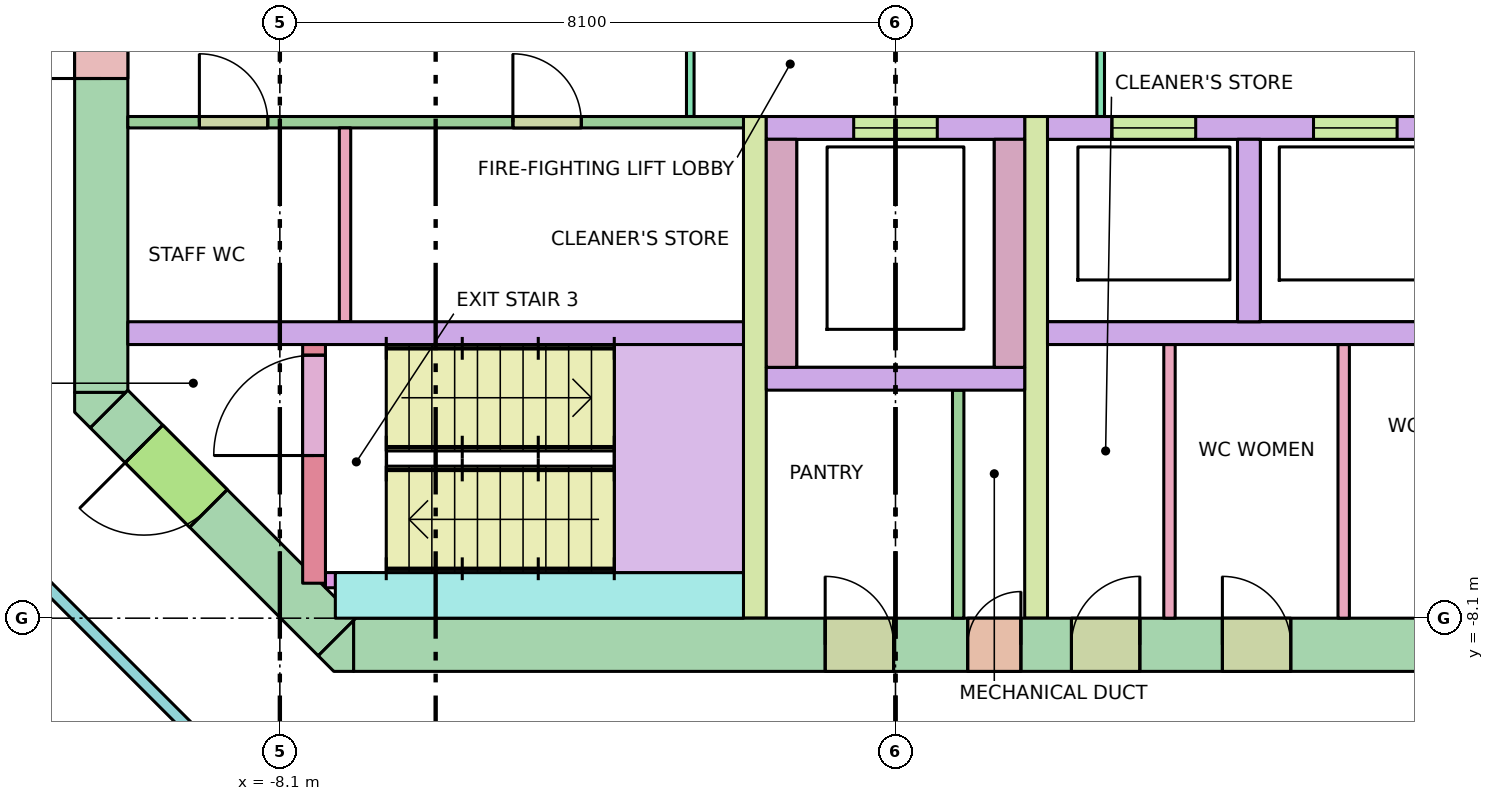
"""IFC4 building model, lengths in metres.
Left out: names, types, materials, properties, quantities, classifications, styles, units other than length and angle.
Written with IfcOpenShell. Run it as: python <this file> out.ifc"""

import sys

from ifc_helpers import new_model, si_unit, direction, frame, frame_2d, origin, place, context, subcontext, project, spatial, polyline, rectangle, outline, extrude, element, fill, save


model = new_model("IFC4")
c1 = context("Model", 3, precision=1e-05, world=origin(), true_north=direction((0.0, 1.0)))
c2 = subcontext(c1, "Body", "Model", "MODEL_VIEW")
j1 = project(units=[si_unit("LENGTHUNIT", "METRE"), si_unit("PLANEANGLEUNIT", "RADIAN")], contexts=[c1])
p1 = place(None, origin())
s1 = spatial("IfcSite", under=j1, at=p1, CompositionType="ELEMENT")
p2 = place(p1, origin())
s2 = spatial("IfcBuilding", under=s1, at=p2, CompositionType="ELEMENT")
p3 = place(p2, frame((0.0, 0.0, 192.8)))
s3 = spatial("IfcBuildingStorey", under=s2, at=p3, CompositionType="ELEMENT", Elevation=192.8)
p4 = place(p3, frame((-7.13, -8.45, -0.28), z_axis=(0.0, 0.0, 1.0), x_axis=(1.0, 0.0, 0.0)))
e1 = element("IfcWall", 1, at=p4, inside=s3, PredefinedType="SHEAR", context=c2, shape_type="SweptSolid", body=[
    extrude(rectangle(XDim=14.26, YDim=0.7, at=frame_2d((7.13, 0.0))), origin(), (0.0, 0.0, 1.0), 3.7),
])
p5 = place(p4, frame((8.08, 0.0, 0.28)))
e2 = element("IfcOpeningElement", 2, at=p5, cuts=e1, PredefinedType="OPENING", context=c2, shape_type="SweptSolid", body=[
    extrude(rectangle(XDim=0.7, YDim=2.1, at=frame_2d((0.35, 1.05))), frame((0.0, 0.36, 0.0), z_axis=(0.0, -1.0, 0.0), x_axis=(1.0, 0.0, 0.0)), (0.0, 0.0, 1.0), 0.72),
])
p6 = place(p4, frame((6.205, 0.0, 0.28)))
e3 = element("IfcOpeningElement", 3, at=p6, cuts=e1, PredefinedType="OPENING", context=c2, shape_type="SweptSolid", body=[
    extrude(rectangle(XDim=0.9, YDim=2.1, at=frame_2d((0.45, 1.05))), frame((0.0, 0.36, 0.0), z_axis=(0.0, -1.0, 0.0), x_axis=(1.0, 0.0, 0.0)), (0.0, 0.0, 1.0), 0.72),
])
p7 = place(p4, frame((9.445, 0.0, 0.28)))
e4 = element("IfcOpeningElement", 4, at=p7, cuts=e1, PredefinedType="OPENING", context=c2, shape_type="SweptSolid", body=[
    extrude(rectangle(XDim=0.9, YDim=2.1, at=frame_2d((0.45, 1.05))), frame((0.0, 0.36, 0.0), z_axis=(0.0, -1.0, 0.0), x_axis=(1.0, 0.0, 0.0)), (0.0, 0.0, 1.0), 0.72),
])
p8 = place(p4, frame((11.431, 0.0, 0.28)))
e5 = element("IfcOpeningElement", 5, at=p8, cuts=e1, PredefinedType="OPENING", context=c2, shape_type="SweptSolid", body=[
    extrude(rectangle(XDim=0.9, YDim=2.1, at=frame_2d((0.45, 1.05))), frame((0.0, 0.36, 0.0), z_axis=(0.0, -1.0, 0.0), x_axis=(1.0, 0.0, 0.0)), (0.0, 0.0, 1.0), 0.72),
])
p9 = place(p3, frame((-10.45, -5.13, -0.28), z_axis=(0.0, 0.0, 1.0), x_axis=(0.0, 1.0, 0.0)))
e6 = element("IfcWall", 6, at=p9, inside=s3, PredefinedType="SHEAR", context=c2, shape_type="SweptSolid", body=[
    extrude(rectangle(XDim=10.26, YDim=0.7, at=frame_2d((5.13, 0.0))), origin(), (0.0, 0.0, 1.0), 3.7),
])
p10 = place(p9, frame((4.13, 0.0, 0.28)))
e7 = element("IfcOpeningElement", 7, at=p10, cuts=e6, PredefinedType="OPENING", context=c2, shape_type="SweptSolid", body=[
    extrude(rectangle(XDim=2.0, YDim=2.1, at=frame_2d((1.0, 1.05))), frame((0.0, 0.36, 0.0), z_axis=(0.0, -1.0, 0.0), x_axis=(1.0, 0.0, 0.0)), (0.0, 0.0, 1.0), 0.72),
])
p11 = place(p3, frame((-7.347, -8.347, -0.28), z_axis=(0.0, 0.0, 1.0), x_axis=(-0.707106781187, 0.707106781187, 0.0)))
e8 = element("IfcWall", 8, at=p11, inside=s3, PredefinedType="SHEAR", context=c2, shape_type="SweptSolid", body=[
    extrude(rectangle(XDim=4.243, YDim=0.7, at=frame_2d((2.121, 0.0))), origin(), (0.0, 0.0, 1.0), 3.7),
])
p12 = place(p11, frame((2.393, 0.0, 0.28)))
e9 = element("IfcOpeningElement", 9, at=p12, cuts=e8, PredefinedType="OPENING", context=c2, shape_type="SweptSolid", body=[
    extrude(rectangle(XDim=1.2, YDim=2.1, at=frame_2d((0.6, 1.05))), frame((0.0, 0.36, 0.0), z_axis=(0.0, -1.0, 0.0), x_axis=(1.0, 0.0, 0.0)), (0.0, 0.0, 1.0), 0.72),
])
p13 = place(p3, frame((0.0, 0.0, -0.28)))
e10 = element("IfcWall", 10, at=p13, inside=s3, PredefinedType="SHEAR", context=c2, shape_type="SweptSolid", body=[
    extrude(outline(polyline([(-7.39, -8.8), (-7.595, -8.595), (-7.595, -8.595), (-7.595, -8.595), (-7.13, -8.13), (-7.13, -8.8), (-7.13, -8.8), (-7.39, -8.8)])), origin(), (0.0, 0.0, 1.0), 3.7),
])
p14 = place(p3, frame((0.0, 0.0, -0.28)))
e11 = element("IfcWall", 11, at=p14, inside=s3, PredefinedType="SHEAR", context=c2, shape_type="SweptSolid", body=[
    extrude(outline(polyline([(-10.8, -5.39), (-10.8, -5.13), (-10.8, -5.13), (-10.13, -5.13), (-10.595, -5.595), (-10.595, -5.595), (-10.595, -5.595), (-10.8, -5.39)])), origin(), (0.0, 0.0, 1.0), 3.7),
])
for number, where, z_axis, x_axis in (
    (12, (-10.1, -4.35, 0.0), (0.0, 0.0, 1.0), (1.0, 0.0, 0.0)),
    (13, (2.0, -4.35, 0.0), (0.0, 0.0, 1.0), (1.0, 0.0, 0.0)),
):
    element("IfcWall", number, at=place(p3, frame(where, z_axis=z_axis, x_axis=x_axis)), inside=s3, PredefinedType="SOLIDWALL", context=c2, shape_type="SweptSolid", body=[
        extrude(rectangle(XDim=8.1, YDim=0.3, at=frame_2d((4.05, 0.0))), origin(), (0.0, 0.0, 1.0), 3.42),
    ])
p15 = place(p3, frame((2.0, -1.65, 0.0), z_axis=(0.0, 0.0, 1.0), x_axis=(1.0, 0.0, 0.0)))
e14 = element("IfcWall", 14, at=p15, inside=s3, PredefinedType="SOLIDWALL", context=c2, shape_type="SweptSolid", body=[
    extrude(rectangle(XDim=8.1, YDim=0.3, at=frame_2d((4.05, 0.0))), origin(), (0.0, 0.0, 1.0), 3.42),
])
p16 = place(p15, frame((0.85, 0.0, 0.0)))
e15 = element("IfcOpeningElement", 15, at=p16, cuts=e14, PredefinedType="OPENING", context=c2, shape_type="SweptSolid", body=[
    extrude(rectangle(XDim=1.1, YDim=2.1, at=frame_2d((0.55, 1.05))), frame((0.0, 0.16, 0.0), z_axis=(0.0, -1.0, 0.0), x_axis=(1.0, 0.0, 0.0)), (0.0, 0.0, 1.0), 0.32),
])
p17 = place(p15, frame((3.5, 0.0, 0.0)))
e16 = element("IfcOpeningElement", 16, at=p17, cuts=e14, PredefinedType="OPENING", context=c2, shape_type="SweptSolid", body=[
    extrude(rectangle(XDim=1.1, YDim=2.1, at=frame_2d((0.55, 1.05))), frame((0.0, 0.16, 0.0), z_axis=(0.0, -1.0, 0.0), x_axis=(1.0, 0.0, 0.0)), (0.0, 0.0, 1.0), 0.32),
])
p18 = place(p15, frame((6.3, 0.0, 0.0)))
e17 = element("IfcOpeningElement", 17, at=p18, cuts=e14, PredefinedType="OPENING", context=c2, shape_type="SweptSolid", body=[
    extrude(rectangle(XDim=1.1, YDim=2.1, at=frame_2d((0.55, 1.05))), frame((0.0, 0.16, 0.0), z_axis=(0.0, -1.0, 0.0), x_axis=(1.0, 0.0, 0.0)), (0.0, 0.0, 1.0), 0.32),
])
p19 = place(p3, frame((4.65, -4.2, 0.0), z_axis=(0.0, 0.0, 1.0), x_axis=(0.0, 1.0, 0.0)))
e18 = element("IfcWall", 18, at=p19, inside=s3, PredefinedType="SOLIDWALL", context=c2, shape_type="SweptSolid", body=[
    extrude(rectangle(XDim=2.4, YDim=0.3, at=frame_2d((1.2, 0.0))), origin(), (0.0, 0.0, 1.0), 3.42),
])
for number, where, z_axis, x_axis in (
    (19, (-1.85, -8.1, 0.0), (0.0, 0.0, 1.0), (0.0, 1.0, 0.0)),
    (20, (1.85, -8.1, 0.0), (0.0, 0.0, 1.0), (0.0, 1.0, 0.0)),
):
    element("IfcWall", number, at=place(p3, frame(where, z_axis=z_axis, x_axis=x_axis)), inside=s3, PredefinedType="SHEAR", context=c2, shape_type="SweptSolid", body=[
        extrude(rectangle(XDim=6.6, YDim=0.3, at=frame_2d((3.3, 0.0))), origin(), (0.0, 0.0, 1.0), 3.42),
    ])
p20 = place(p3, frame((-1.7, -1.65, 0.0), z_axis=(0.0, 0.0, 1.0), x_axis=(1.0, 0.0, 0.0)))
e21 = element("IfcWall", 21, at=p20, inside=s3, PredefinedType="SOLIDWALL", context=c2, shape_type="SweptSolid", body=[
    extrude(rectangle(XDim=3.4, YDim=0.3, at=frame_2d((1.7, 0.0))), origin(), (0.0, 0.0, 1.0), 3.42),
])
p21 = place(p20, frame((1.15, 0.0, 0.0)))
e22 = element("IfcOpeningElement", 22, at=p21, cuts=e21, PredefinedType="OPENING", context=c2, shape_type="SweptSolid", body=[
    extrude(rectangle(XDim=1.1, YDim=2.1, at=frame_2d((0.55, 1.05))), frame((0.0, 0.16, 0.0), z_axis=(0.0, -1.0, 0.0), x_axis=(1.0, 0.0, 0.0)), (0.0, 0.0, 1.0), 0.32),
])
for number, where, z_axis, x_axis in (
    (23, (-1.5, -4.8, 0.0), (0.0, 0.0, 1.0), (0.0, 1.0, 0.0)),
    (24, (1.5, -4.8, 0.0), (0.0, 0.0, 1.0), (0.0, 1.0, 0.0)),
):
    element("IfcWall", number, at=place(p3, frame(where, z_axis=z_axis, x_axis=x_axis)), inside=s3, PredefinedType="SOLIDWALL", context=c2, shape_type="SweptSolid", body=[
        extrude(rectangle(XDim=3.0, YDim=0.4, at=frame_2d((1.5, 0.0))), origin(), (0.0, 0.0, 1.0), 3.42),
    ])
p22 = place(p3, frame((-1.7, -4.95, 0.0), z_axis=(0.0, 0.0, 1.0), x_axis=(1.0, 0.0, 0.0)))
e25 = element("IfcWall", 25, at=p22, inside=s3, PredefinedType="SOLIDWALL", context=c2, shape_type="SweptSolid", body=[
    extrude(rectangle(XDim=3.4, YDim=0.3, at=frame_2d((1.7, 0.0))), origin(), (0.0, 0.0, 1.0), 3.42),
])
p23 = place(p3, frame((-7.65, -7.64, 0.0), z_axis=(0.0, 0.0, 1.0), x_axis=(0.0, 1.0, 0.0)))
e26 = element("IfcWall", 26, at=p23, inside=s3, PredefinedType="SHEAR", context=c2, shape_type="SweptSolid", body=[
    extrude(rectangle(XDim=3.14, YDim=0.3, at=frame_2d((1.57, 0.0))), origin(), (0.0, 0.0, 1.0), 3.42),
])
p24 = place(p23, frame((1.68, 0.0, 0.0)))
e27 = element("IfcOpeningElement", 27, at=p24, cuts=e26, PredefinedType="OPENING", context=c2, shape_type="SweptSolid", body=[
    extrude(rectangle(XDim=1.32, YDim=2.1, at=frame_2d((0.66, 1.05))), frame((0.0, 0.16, 0.0), z_axis=(0.0, -1.0, 0.0), x_axis=(1.0, 0.0, 0.0)), (0.0, 0.0, 1.0), 0.32),
])
p25 = place(p3, frame((-7.5, -7.6, 0.0), z_axis=(0.0, 0.0, 1.0), x_axis=(1.0, 0.0, 0.0)))
e28 = element("IfcWall", 28, at=p25, inside=s3, PredefinedType="SHEAR", context=c2, shape_type="SweptSolid", body=[
    extrude(rectangle(XDim=0.6, YDim=0.2, at=frame_2d((0.3, 0.0))), origin(), (0.0, 0.0, 1.0), 3.42),
])
p26 = place(p3, frame((-7.37, -7.8, 0.0), z_axis=(0.0, 0.0, 1.0), x_axis=(1.0, 0.0, 0.0)))
e29 = element("IfcWall", 29, at=p26, inside=s3, PredefinedType="SHEAR", context=c2, shape_type="SweptSolid", body=[
    extrude(rectangle(XDim=5.37, YDim=0.6, at=frame_2d((2.685, 0.0))), origin(), (0.0, 0.0, 1.0), 3.42),
])
p27 = place(p3, frame((-2.7, -1.5, 0.0), z_axis=(0.0, 0.0, 1.0), x_axis=(0.0, 1.0, 0.0)))
e30 = element("IfcWall", 30, at=p27, inside=s3, PredefinedType="PARTITIONING", context=c2, shape_type="SweptSolid", body=[
    extrude(rectangle(XDim=3.0, YDim=0.1, at=frame_2d((1.5, 0.0))), origin(), (0.0, 0.0, 1.0), 3.42),
])
p28 = place(p27, frame((0.9, 0.0, 0.0)))
e31 = element("IfcOpeningElement", 31, at=p28, cuts=e30, PredefinedType="OPENING", context=c2, shape_type="SweptSolid", body=[
    extrude(rectangle(XDim=1.2, YDim=2.1, at=frame_2d((0.6, 1.05))), frame((0.0, 0.06, 0.0), z_axis=(0.0, -1.0, 0.0), x_axis=(1.0, 0.0, 0.0)), (0.0, 0.0, 1.0), 0.12),
])
p29 = place(p3, frame((2.7, -1.5, 0.0), z_axis=(0.0, 0.0, 1.0), x_axis=(0.0, 1.0, 0.0)))
e32 = element("IfcWall", 32, at=p29, inside=s3, PredefinedType="PARTITIONING", context=c2, shape_type="SweptSolid", body=[
    extrude(rectangle(XDim=3.0, YDim=0.1, at=frame_2d((1.5, 0.0))), origin(), (0.0, 0.0, 1.0), 3.42),
])
p30 = place(p29, frame((0.9, 0.0, 0.0)))
e33 = element("IfcOpeningElement", 33, at=p30, cuts=e32, PredefinedType="OPENING", context=c2, shape_type="SweptSolid", body=[
    extrude(rectangle(XDim=1.2, YDim=2.1, at=frame_2d((0.6, 1.05))), frame((0.0, 0.06, 0.0), z_axis=(0.0, -1.0, 0.0), x_axis=(1.0, 0.0, 0.0)), (0.0, 0.0, 1.0), 0.12),
])
p31 = place(p3, frame((0.825, -8.1, 0.0), z_axis=(0.0, 0.0, 1.0), x_axis=(0.0, 1.0, 0.0)))
e34 = element("IfcWall", 34, at=p31, inside=s3, PredefinedType="PARTITIONING", context=c2, shape_type="SweptSolid", body=[
    extrude(rectangle(XDim=3.0, YDim=0.15, at=frame_2d((1.5, 0.0))), origin(), (0.0, 0.0, 1.0), 3.42),
])
for number, where, z_axis, x_axis in (
    (35, (3.605, -8.1, 0.0), (0.0, 0.0, 1.0), (0.0, 1.0, 0.0)),
    (36, (5.897, -8.1, 0.0), (0.0, 0.0, 1.0), (0.0, 1.0, 0.0)),
):
    element("IfcWall", number, at=place(p3, frame(where, z_axis=z_axis, x_axis=x_axis)), inside=s3, PredefinedType="PARTITIONING", context=c2, shape_type="SweptSolid", body=[
        extrude(rectangle(XDim=3.6, YDim=0.15, at=frame_2d((1.8, 0.0))), origin(), (0.0, 0.0, 1.0), 3.42),
    ])
p32 = place(p3, frame((-7.242, -4.2, 0.0), z_axis=(0.0, 0.0, 1.0), x_axis=(0.0, 1.0, 0.0)))
e37 = element("IfcWall", 37, at=p32, inside=s3, PredefinedType="PARTITIONING", context=c2, shape_type="SweptSolid", body=[
    extrude(rectangle(XDim=2.55, YDim=0.15, at=frame_2d((1.275, 0.0))), origin(), (0.0, 0.0, 1.0), 3.42),
])
p33 = place(p3, frame((-10.1, -1.575, 0.0), z_axis=(0.0, 0.0, 1.0), x_axis=(1.0, 0.0, 0.0)))
e38 = element("IfcWall", 38, at=p33, inside=s3, PredefinedType="PARTITIONING", context=c2, shape_type="SweptSolid", body=[
    extrude(rectangle(XDim=8.1, YDim=0.15, at=frame_2d((4.05, 0.0))), origin(), (0.0, 0.0, 1.0), 3.42),
])
p34 = place(p33, frame((0.941, 0.0, 0.0)))
e39 = element("IfcOpeningElement", 39, at=p34, cuts=e38, PredefinedType="OPENING", context=c2, shape_type="SweptSolid", body=[
    extrude(rectangle(XDim=0.9, YDim=2.1, at=frame_2d((0.45, 1.05))), frame((0.0, 0.085, 0.0), z_axis=(0.0, -1.0, 0.0), x_axis=(1.0, 0.0, 0.0)), (0.0, 0.0, 1.0), 0.17),
])
p35 = place(p33, frame((5.066, 0.0, 0.0)))
e40 = element("IfcOpeningElement", 40, at=p35, cuts=e38, PredefinedType="OPENING", context=c2, shape_type="SweptSolid", body=[
    extrude(rectangle(XDim=0.9, YDim=2.1, at=frame_2d((0.45, 1.05))), frame((0.0, 0.085, 0.0), z_axis=(0.0, -1.0, 0.0), x_axis=(1.0, 0.0, 0.0)), (0.0, 0.0, 1.0), 0.17),
])
p36 = place(p3, frame((-8.204, -10.638, 0.0), z_axis=(0.0, 0.0, 1.0), x_axis=(-0.707106781187, 0.707106781187, 0.0)))
e41 = element("IfcWall", 41, at=p36, inside=s3, PredefinedType="PARTITIONING", context=c2, shape_type="SweptSolid", body=[
    extrude(rectangle(XDim=6.271, YDim=0.15, at=frame_2d((3.135, 0.0))), origin(), (0.0, 0.0, 1.0), 2.62),
])
p37 = place(p16, origin())
e42 = element("IfcDoor", 42, at=p37, inside=s3, OperationType="DOUBLE_DOOR_SLIDING", PredefinedType="DOOR", context=c2, shape_type="SweptSolid", body=[
    extrude(rectangle(XDim=1.1, YDim=2.1, at=frame_2d((0.55, 1.05))), frame((0.0, 0.025, 0.0), z_axis=(0.0, -1.0, 0.0), x_axis=(1.0, 0.0, 0.0)), (0.0, 0.0, 1.0), 0.05),
])
fill(e15, e42)
p38 = place(p17, origin())
e43 = element("IfcDoor", 43, at=p38, inside=s3, OperationType="DOUBLE_DOOR_SLIDING", PredefinedType="DOOR", context=c2, shape_type="SweptSolid", body=[
    extrude(rectangle(XDim=1.1, YDim=2.1, at=frame_2d((0.55, 1.05))), frame((0.0, 0.025, 0.0), z_axis=(0.0, -1.0, 0.0), x_axis=(1.0, 0.0, 0.0)), (0.0, 0.0, 1.0), 0.05),
])
fill(e16, e43)
p39 = place(p21, origin())
e44 = element("IfcDoor", 44, at=p39, inside=s3, OperationType="DOUBLE_DOOR_SLIDING", PredefinedType="DOOR", context=c2, shape_type="SweptSolid", body=[
    extrude(rectangle(XDim=1.1, YDim=2.1, at=frame_2d((0.55, 1.05))), frame((0.0, 0.025, 0.0), z_axis=(0.0, -1.0, 0.0), x_axis=(1.0, 0.0, 0.0)), (0.0, 0.0, 1.0), 0.05),
])
fill(e22, e44)
p40 = place(p24, origin())
e45 = element("IfcDoor", 45, at=p40, inside=s3, OperationType="DOUBLE_DOOR_SINGLE_SWING", PredefinedType="DOOR", context=c2, shape_type="SweptSolid", body=[
    extrude(rectangle(XDim=1.32, YDim=2.1, at=frame_2d((0.66, 1.05))), frame((0.0, 0.025, 0.0), z_axis=(0.0, -1.0, 0.0), x_axis=(1.0, 0.0, 0.0)), (0.0, 0.0, 1.0), 0.05),
])
fill(e27, e45)
p41 = place(p12, origin())
e46 = element("IfcDoor", 46, at=p41, inside=s3, OperationType="SINGLE_SWING_RIGHT", PredefinedType="DOOR", context=c2, shape_type="SweptSolid", body=[
    extrude(rectangle(XDim=1.2, YDim=2.1, at=frame_2d((0.6, 1.05))), frame((0.0, 0.025, 0.0), z_axis=(0.0, -1.0, 0.0), x_axis=(1.0, 0.0, 0.0)), (0.0, 0.0, 1.0), 0.05),
])
fill(e9, e46)
p42 = place(p10, origin())
e47 = element("IfcDoor", 47, at=p42, inside=s3, OperationType="DOUBLE_DOOR_SINGLE_SWING", PredefinedType="DOOR", context=c2, shape_type="SweptSolid", body=[
    extrude(rectangle(XDim=2.0, YDim=2.1, at=frame_2d((1.0, 1.05))), frame((0.0, 0.025, 0.0), z_axis=(0.0, -1.0, 0.0), x_axis=(1.0, 0.0, 0.0)), (0.0, 0.0, 1.0), 0.05),
])
fill(e7, e47)
p43 = place(p5, origin())
e48 = element("IfcDoor", 48, at=p43, inside=s3, OperationType="SINGLE_SWING_RIGHT", PredefinedType="DOOR", context=c2, shape_type="SweptSolid", body=[
    extrude(rectangle(XDim=0.7, YDim=2.1, at=frame_2d((0.35, 1.05))), frame((0.0, 0.025, 0.0), z_axis=(0.0, -1.0, 0.0), x_axis=(1.0, 0.0, 0.0)), (0.0, 0.0, 1.0), 0.05),
])
fill(e2, e48)
p44 = place(p6, origin())
e49 = element("IfcDoor", 49, at=p44, inside=s3, OperationType="SINGLE_SWING_LEFT", PredefinedType="DOOR", context=c2, shape_type="SweptSolid", body=[
    extrude(rectangle(XDim=0.9, YDim=2.1, at=frame_2d((0.45, 1.05))), frame((0.0, 0.025, 0.0), z_axis=(0.0, -1.0, 0.0), x_axis=(1.0, 0.0, 0.0)), (0.0, 0.0, 1.0), 0.05),
])
fill(e3, e49)
p45 = place(p7, origin())
e50 = element("IfcDoor", 50, at=p45, inside=s3, OperationType="SINGLE_SWING_RIGHT", PredefinedType="DOOR", context=c2, shape_type="SweptSolid", body=[
    extrude(rectangle(XDim=0.9, YDim=2.1, at=frame_2d((0.45, 1.05))), frame((0.0, 0.025, 0.0), z_axis=(0.0, -1.0, 0.0), x_axis=(1.0, 0.0, 0.0)), (0.0, 0.0, 1.0), 0.05),
])
fill(e4, e50)
p46 = place(p8, origin())
e51 = element("IfcDoor", 51, at=p46, inside=s3, OperationType="SINGLE_SWING_LEFT", PredefinedType="DOOR", context=c2, shape_type="SweptSolid", body=[
    extrude(rectangle(XDim=0.9, YDim=2.1, at=frame_2d((0.45, 1.05))), frame((0.0, 0.025, 0.0), z_axis=(0.0, -1.0, 0.0), x_axis=(1.0, 0.0, 0.0)), (0.0, 0.0, 1.0), 0.05),
])
fill(e5, e51)
p47 = place(p34, origin())
e52 = element("IfcDoor", 52, at=p47, inside=s3, OperationType="SINGLE_SWING_LEFT", PredefinedType="DOOR", context=c2, shape_type="SweptSolid", body=[
    extrude(rectangle(XDim=0.9, YDim=2.1, at=frame_2d((0.45, 1.05))), frame((0.0, 0.025, 0.0), z_axis=(0.0, -1.0, 0.0), x_axis=(1.0, 0.0, 0.0)), (0.0, 0.0, 1.0), 0.05),
])
fill(e39, e52)
p48 = place(p35, origin())
e53 = element("IfcDoor", 53, at=p48, inside=s3, OperationType="SINGLE_SWING_LEFT", PredefinedType="DOOR", context=c2, shape_type="SweptSolid", body=[
    extrude(rectangle(XDim=0.9, YDim=2.1, at=frame_2d((0.45, 1.05))), frame((0.0, 0.025, 0.0), z_axis=(0.0, -1.0, 0.0), x_axis=(1.0, 0.0, 0.0)), (0.0, 0.0, 1.0), 0.05),
])
fill(e40, e53)
save(model, sys.argv[1])
